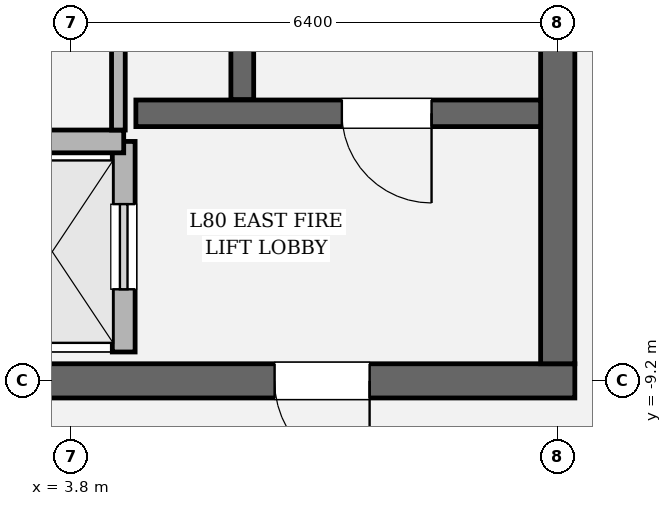
"""IFC4 building model, lengths in metres.
Left out: names, types, materials, properties, quantities, classifications, styles, units other than length and angle.
Written with IfcOpenShell. Run it as: python <this file> out.ifc"""

import sys

from ifc_helpers import new_model, si_unit, direction, frame, frame_2d, origin, place, context, subcontext, project, spatial, rectangle, extrude, element, fill, save


model = new_model("IFC4")
c1 = context("Model", 3, precision=1e-05, world=origin(), true_north=direction((0.0, 1.0)))
c2 = subcontext(c1, "Body", "Model", "MODEL_VIEW")
j1 = project(units=[si_unit("LENGTHUNIT", "METRE"), si_unit("PLANEANGLEUNIT", "RADIAN")], contexts=[c1])
p1 = place(None, origin())
s1 = spatial("IfcSite", under=j1, at=p1, CompositionType="ELEMENT")
p2 = place(p1, origin())
s2 = spatial("IfcBuilding", under=s1, at=p2, CompositionType="ELEMENT")
p3 = place(p2, frame((0.0, 0.0, 339.0)))
s3 = spatial("IfcBuildingStorey", under=s2, at=p3, CompositionType="ELEMENT", Elevation=339.0)
p4 = place(p3, frame((10.425, -9.2, 0.0), z_axis=(0.0, 0.0, 1.0), x_axis=(-1.0, 0.0, 0.0)))
e1 = element("IfcWall", 1, at=p4, inside=s3, PredefinedType="SHEAR", context=c2, shape_type="SweptSolid", body=[
    extrude(rectangle(XDim=20.85, YDim=0.45, at=frame_2d((10.425, 0.0))), origin(), (0.0, 0.0, 1.0), 4.8),
])
p5 = place(p4, frame((2.7, 0.0, 0.0)))
e2 = element("IfcOpeningElement", 2, at=p5, cuts=e1, PredefinedType="OPENING", context=c2, shape_type="SweptSolid", body=[
    extrude(rectangle(XDim=1.25, YDim=2.25, at=frame_2d((0.625, 1.125))), frame((0.0, 0.235, 0.0), z_axis=(0.0, -1.0, 0.0), x_axis=(1.0, 0.0, 0.0)), (0.0, 0.0, 1.0), 0.47),
])
p6 = place(p4, frame((16.9, 0.0, 0.0)))
e3 = element("IfcOpeningElement", 3, at=p6, cuts=e1, PredefinedType="OPENING", context=c2, shape_type="SweptSolid", body=[
    extrude(rectangle(XDim=1.25, YDim=2.25, at=frame_2d((0.625, 1.125))), frame((0.0, 0.235, 0.0), z_axis=(0.0, -1.0, 0.0), x_axis=(1.0, 0.0, 0.0)), (0.0, 0.0, 1.0), 0.47),
])
p7 = place(p4, frame((10.925, 0.0, 0.0)))
e4 = element("IfcOpeningElement", 4, at=p7, cuts=e1, PredefinedType="OPENING", context=c2, shape_type="SweptSolid", body=[
    extrude(rectangle(XDim=1.2, YDim=2.3, at=frame_2d((0.6, 1.15))), frame((0.0, 0.235, 0.0), z_axis=(0.0, -1.0, 0.0), x_axis=(1.0, 0.0, 0.0)), (0.0, 0.0, 1.0), 0.47),
])
p8 = place(p4, frame((8.725, 0.0, 0.0)))
e5 = element("IfcOpeningElement", 5, at=p8, cuts=e1, PredefinedType="OPENING", context=c2, shape_type="SweptSolid", body=[
    extrude(rectangle(XDim=1.2, YDim=2.3, at=frame_2d((0.6, 1.15))), frame((0.0, 0.235, 0.0), z_axis=(0.0, -1.0, 0.0), x_axis=(1.0, 0.0, 0.0)), (0.0, 0.0, 1.0), 0.47),
])
p9 = place(p3, frame((10.2, 8.975, 0.0), z_axis=(0.0, 0.0, 1.0), x_axis=(0.0, -1.0, 0.0)))
e6 = element("IfcWall", 6, at=p9, inside=s3, PredefinedType="SHEAR", context=c2, shape_type="SweptSolid", body=[
    extrude(rectangle(XDim=17.95, YDim=0.45, at=frame_2d((8.975, 0.0))), origin(), (0.0, 0.0, 1.0), 4.8),
])
p10 = place(p9, frame((4.005, 0.0, 0.0)))
e7 = element("IfcOpeningElement", 7, at=p10, cuts=e6, PredefinedType="OPENING", context=c2, shape_type="SweptSolid", body=[
    extrude(rectangle(XDim=1.18, YDim=2.2, at=frame_2d((0.59, 1.1))), frame((0.0, 0.235, 0.0), z_axis=(0.0, -1.0, 0.0), x_axis=(1.0, 0.0, 0.0)), (0.0, 0.0, 1.0), 0.47),
])
p11 = place(p3, frame((6.05, 3.45, 0.0), z_axis=(0.0, 0.0, 1.0), x_axis=(0.0, -1.0, 0.0)))
e8 = element("IfcWall", 8, at=p11, inside=s3, PredefinedType="SOLIDWALL", context=c2, shape_type="SweptSolid", body=[
    extrude(rectangle(XDim=8.95, YDim=0.3, at=frame_2d((4.475, 0.0))), origin(), (0.0, 0.0, 1.0), 4.8),
])
p12 = place(p3, frame((4.65, -5.68, 0.0), z_axis=(0.0, 0.0, 1.0), x_axis=(1.0, 0.0, 0.0)))
e9 = element("IfcWall", 9, at=p12, inside=s3, PredefinedType="SOLIDWALL", context=c2, shape_type="SweptSolid", body=[
    extrude(rectangle(XDim=5.325, YDim=0.35, at=frame_2d((2.663, 0.0))), origin(), (0.0, 0.0, 1.0), 4.8),
])
p13 = place(p12, frame((2.71, 0.0, 0.0)))
e10 = element("IfcOpeningElement", 10, at=p13, cuts=e9, PredefinedType="OPENING", context=c2, shape_type="SweptSolid", body=[
    extrude(rectangle(XDim=1.18, YDim=2.2, at=frame_2d((0.59, 1.1))), frame((0.0, 0.185, 0.0), z_axis=(0.0, -1.0, 0.0), x_axis=(1.0, 0.0, 0.0)), (0.0, 0.0, 1.0), 0.37),
])
p14 = place(p3, frame((4.49, -8.82, 0.0), z_axis=(0.0, 0.0, 1.0), x_axis=(0.0, 1.0, 0.0)))
e11 = element("IfcWall", 11, at=p14, inside=s3, PredefinedType="SOLIDWALL", context=c2, shape_type="SweptSolid", body=[
    extrude(rectangle(XDim=2.77, YDim=0.3, at=frame_2d((1.385, 0.0))), origin(), (0.0, 0.0, 1.0), 4.52),
])
p15 = place(p14, frame((0.825, 0.0, 0.0)))
e12 = element("IfcOpeningElement", 12, at=p15, cuts=e11, PredefinedType="OPENING", context=c2, shape_type="SweptSolid", body=[
    extrude(rectangle(XDim=1.12, YDim=2.25, at=frame_2d((0.56, 1.125))), frame((0.0, 0.16, 0.0), z_axis=(0.0, -1.0, 0.0), x_axis=(1.0, 0.0, 0.0)), (0.0, 0.0, 1.0), 0.32),
])
p16 = place(p3, frame((2.61, -6.05, 0.0), z_axis=(0.0, 0.0, 1.0), x_axis=(1.0, 0.0, 0.0)))
e13 = element("IfcWall", 13, at=p16, inside=s3, PredefinedType="SOLIDWALL", context=c2, shape_type="SweptSolid", body=[
    extrude(rectangle(XDim=1.88, YDim=0.3, at=frame_2d((0.94, 0.0))), origin(), (0.0, 0.0, 1.0), 4.52),
])
p17 = place(p3, frame((4.42, -5.9, 0.0), z_axis=(0.0, 0.0, 1.0), x_axis=(0.0, 1.0, 0.0)))
e14 = element("IfcWall", 14, at=p17, inside=s3, PredefinedType="PARTITIONING", context=c2, shape_type="SweptSolid", body=[
    extrude(rectangle(XDim=1.74, YDim=0.18, at=frame_2d((0.87, 0.0))), origin(), (0.0, 0.0, 1.0), 4.52),
])
p18 = place(p13, origin())
e15 = element("IfcDoor", 15, at=p18, inside=s3, OperationType="SINGLE_SWING_RIGHT", PredefinedType="DOOR", context=c2, shape_type="SweptSolid", body=[
    extrude(rectangle(XDim=1.18, YDim=2.2, at=frame_2d((0.59, 1.1))), frame((0.0, 0.025, 0.0), z_axis=(0.0, -1.0, 0.0), x_axis=(1.0, 0.0, 0.0)), (0.0, 0.0, 1.0), 0.05),
])
fill(e10, e15)
p19 = place(p5, origin())
e16 = element("IfcDoor", 16, at=p19, inside=s3, OperationType="SINGLE_SWING_LEFT", PredefinedType="DOOR", context=c2, shape_type="SweptSolid", body=[
    extrude(rectangle(XDim=1.25, YDim=2.25, at=frame_2d((0.625, 1.125))), frame((0.0, 0.025, 0.0), z_axis=(0.0, -1.0, 0.0), x_axis=(1.0, 0.0, 0.0)), (0.0, 0.0, 1.0), 0.05),
])
fill(e2, e16)
p20 = place(p15, origin())
e17 = element("IfcDoor", 17, at=p20, inside=s3, OperationType="SLIDING_TO_RIGHT", PredefinedType="DOOR", context=c2, shape_type="SweptSolid", body=[
    extrude(rectangle(XDim=1.12, YDim=2.25, at=frame_2d((0.56, 1.125))), frame((0.0, 0.025, 0.0), z_axis=(0.0, -1.0, 0.0), x_axis=(1.0, 0.0, 0.0)), (0.0, 0.0, 1.0), 0.05),
])
fill(e12, e17)
save(model, sys.argv[1])
